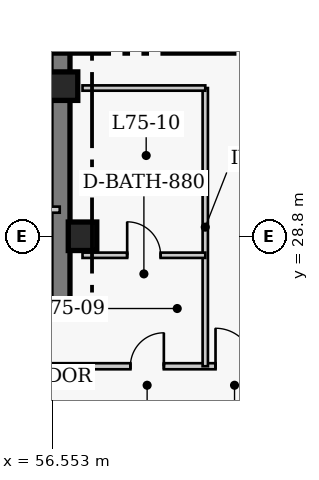
"""IFC4 building model, lengths in metres.
Left out: names, types, materials, properties, quantities, classifications, styles, units other than length and angle.
Written with IfcOpenShell. Run it as: python <this file> out.ifc"""

import sys

from ifc_helpers import new_model, si_unit, direction, frame, frame_2d, origin, origin_2d, place, context, subcontext, project, spatial, rectangle, extrude, element, fill, save


model = new_model("IFC4")
c1 = context("Model", 3, precision=1e-05, world=origin(), true_north=direction((0.0, 1.0)))
c2 = subcontext(c1, "Body", "Model", "MODEL_VIEW")
j1 = project(units=[si_unit("LENGTHUNIT", "METRE"), si_unit("PLANEANGLEUNIT", "RADIAN")], contexts=[c1])
p1 = place(None, origin())
s1 = spatial("IfcSite", under=j1, at=p1, CompositionType="ELEMENT")
p2 = place(p1, origin())
s2 = spatial("IfcBuilding", under=s1, at=p2, CompositionType="ELEMENT")
p3 = place(p2, frame((0.0, 0.0, 302.0)))
s3 = spatial("IfcBuildingStorey", under=s2, at=p3, CompositionType="ELEMENT", Elevation=302.0)
p4 = place(p3, frame((56.77, 27.05, 0.0), z_axis=(0.0, 0.0, 1.0), x_axis=(0.0, 1.0, 0.0)))
e1 = element("IfcWall", 1, at=p4, inside=s3, PredefinedType="SHEAR", context=c2, shape_type="SweptSolid", body=[
    extrude(rectangle(XDim=13.52, YDim=0.5, at=frame_2d((6.76, 0.0))), origin(), (0.0, 0.0, 1.0), 4.6),
])
for number, where, z_axis, x_axis in (
    (2, (57.35, 28.8, 0.0), (0.0, 0.0, 1.0), (1.0, 0.0, 0.0)),
    (3, (56.85, 32.75, 0.0), (0.0, 0.0, 1.0), (1.0, 0.0, 0.0)),
):
    element("IfcColumn", number, at=place(p3, frame(where, z_axis=z_axis, x_axis=x_axis)), inside=s3, PredefinedType="COLUMN", context=c2, shape_type="SweptSolid", body=[
        extrude(rectangle(XDim=0.75, YDim=0.75, at=origin_2d()), origin(), (0.0, 0.0, 1.0), 4.6),
    ])
p5 = place(p3, frame((51.12, 29.5, 0.0), z_axis=(0.0, 0.0, 1.0), x_axis=(1.0, 0.0, 0.0)))
e4 = element("IfcWall", 4, at=p5, inside=s3, PredefinedType="PARTITIONING", context=c2, shape_type="SweptSolid", body=[
    extrude(rectangle(XDim=5.63, YDim=0.16, at=frame_2d((2.815, 0.0))), origin(), (0.0, 0.0, 1.0), 4.31),
])
p6 = place(p3, frame((10.5, 25.38, 0.0), z_axis=(0.0, 0.0, 1.0), x_axis=(1.0, 0.0, 0.0)))
e5 = element("IfcWall", 5, at=p6, inside=s3, PredefinedType="PARTITIONING", context=c2, shape_type="SweptSolid", body=[
    extrude(rectangle(XDim=57.0, YDim=0.16, at=frame_2d((28.5, 0.0))), origin(), (0.0, 0.0, 1.0), 4.31),
])
p7 = place(p6, frame((26.6, 0.0, 0.0)))
e6 = element("IfcOpeningElement", 6, at=p7, cuts=e5, PredefinedType="OPENING", context=c2, shape_type="SweptSolid", body=[
    extrude(rectangle(XDim=1.8, YDim=2.2, at=frame_2d((0.9, 1.1))), frame((0.0, 0.09, 0.0), z_axis=(0.0, -1.0, 0.0), x_axis=(1.0, 0.0, 0.0)), (0.0, 0.0, 1.0), 0.18),
])
p8 = place(p6, frame((17.25, 0.0, 0.0)))
e7 = element("IfcOpeningElement", 7, at=p8, cuts=e5, PredefinedType="OPENING", context=c2, shape_type="SweptSolid", body=[
    extrude(rectangle(XDim=1.0, YDim=2.15, at=frame_2d((0.5, 1.075))), frame((0.0, 0.09, 0.0), z_axis=(0.0, -1.0, 0.0), x_axis=(1.0, 0.0, 0.0)), (0.0, 0.0, 1.0), 0.18),
])
p9 = place(p6, frame((34.5, 0.0, 0.0)))
e8 = element("IfcOpeningElement", 8, at=p9, cuts=e5, PredefinedType="OPENING", context=c2, shape_type="SweptSolid", body=[
    extrude(rectangle(XDim=1.0, YDim=2.15, at=frame_2d((0.5, 1.075))), frame((0.0, 0.09, 0.0), z_axis=(0.0, -1.0, 0.0), x_axis=(1.0, 0.0, 0.0)), (0.0, 0.0, 1.0), 0.18),
])
p10 = place(p6, frame((5.15, 0.0, 0.0)))
e9 = element("IfcOpeningElement", 9, at=p10, cuts=e5, PredefinedType="OPENING", context=c2, shape_type="SweptSolid", body=[
    extrude(rectangle(XDim=1.0, YDim=2.15, at=frame_2d((0.5, 1.075))), frame((0.0, 0.09, 0.0), z_axis=(0.0, -1.0, 0.0), x_axis=(1.0, 0.0, 0.0)), (0.0, 0.0, 1.0), 0.18),
])
p11 = place(p6, frame((48.11, 0.0, 0.0)))
e10 = element("IfcOpeningElement", 10, at=p11, cuts=e5, PredefinedType="OPENING", context=c2, shape_type="SweptSolid", body=[
    extrude(rectangle(XDim=0.88, YDim=2.05, at=frame_2d((0.44, 1.025))), frame((0.0, 0.09, 0.0), z_axis=(0.0, -1.0, 0.0), x_axis=(1.0, 0.0, 0.0)), (0.0, 0.0, 1.0), 0.18),
])
p12 = place(p6, frame((50.35, 0.0, 0.0)))
e11 = element("IfcOpeningElement", 11, at=p12, cuts=e5, PredefinedType="OPENING", context=c2, shape_type="SweptSolid", body=[
    extrude(rectangle(XDim=1.0, YDim=2.15, at=frame_2d((0.5, 1.075))), frame((0.0, 0.09, 0.0), z_axis=(0.0, -1.0, 0.0), x_axis=(1.0, 0.0, 0.0)), (0.0, 0.0, 1.0), 0.18),
])
p13 = place(p3, frame((60.58, 25.38, 0.0), z_axis=(0.0, 0.0, 1.0), x_axis=(0.0, 1.0, 0.0)))
e12 = element("IfcWall", 12, at=p13, inside=s3, PredefinedType="PLUMBINGWALL", context=c2, shape_type="SweptSolid", body=[
    extrude(rectangle(XDim=7.32, YDim=0.14, at=frame_2d((3.66, 0.0))), origin(), (0.0, 0.0, 1.0), 4.31),
])
p14 = place(p3, frame((57.35, 28.3, 0.0), z_axis=(0.0, 0.0, 1.0), x_axis=(1.0, 0.0, 0.0)))
e13 = element("IfcWall", 13, at=p14, inside=s3, PredefinedType="PLUMBINGWALL", context=c2, shape_type="SweptSolid", body=[
    extrude(rectangle(XDim=3.23, YDim=0.14, at=frame_2d((1.615, 0.0))), origin(), (0.0, 0.0, 1.0), 4.31),
])
p15 = place(p14, frame((1.175, 0.0, 0.0)))
e14 = element("IfcOpeningElement", 14, at=p15, cuts=e13, PredefinedType="OPENING", context=c2, shape_type="SweptSolid", body=[
    extrude(rectangle(XDim=0.88, YDim=2.05, at=frame_2d((0.44, 1.025))), frame((0.0, 0.08, 0.0), z_axis=(0.0, -1.0, 0.0), x_axis=(1.0, 0.0, 0.0)), (0.0, 0.0, 1.0), 0.16),
])
p16 = place(p3, frame((57.35, 32.7, 0.0), z_axis=(0.0, 0.0, 1.0), x_axis=(1.0, 0.0, 0.0)))
e15 = element("IfcWall", 15, at=p16, inside=s3, PredefinedType="PLUMBINGWALL", context=c2, shape_type="SweptSolid", body=[
    extrude(rectangle(XDim=3.23, YDim=0.14, at=frame_2d((1.615, 0.0))), origin(), (0.0, 0.0, 1.0), 4.31),
])
p17 = place(p11, origin())
e16 = element("IfcDoor", 16, at=p17, inside=s3, OperationType="SINGLE_SWING_RIGHT", PredefinedType="DOOR", context=c2, shape_type="SweptSolid", body=[
    extrude(rectangle(XDim=0.88, YDim=2.05, at=frame_2d((0.44, 1.025))), frame((0.0, 0.025, 0.0), z_axis=(0.0, -1.0, 0.0), x_axis=(1.0, 0.0, 0.0)), (0.0, 0.0, 1.0), 0.05),
])
fill(e10, e16)
p18 = place(p15, origin())
e17 = element("IfcDoor", 17, at=p18, inside=s3, OperationType="SINGLE_SWING_LEFT", PredefinedType="DOOR", context=c2, shape_type="SweptSolid", body=[
    extrude(rectangle(XDim=0.88, YDim=2.05, at=frame_2d((0.44, 1.025))), frame((0.0, 0.025, 0.0), z_axis=(0.0, -1.0, 0.0), x_axis=(1.0, 0.0, 0.0)), (0.0, 0.0, 1.0), 0.05),
])
fill(e14, e17)
p19 = place(p12, origin())
e18 = element("IfcDoor", 18, at=p19, inside=s3, OperationType="SINGLE_SWING_LEFT", PredefinedType="DOOR", context=c2, shape_type="SweptSolid", body=[
    extrude(rectangle(XDim=1.0, YDim=2.15, at=frame_2d((0.5, 1.075))), frame((0.0, 0.025, 0.0), z_axis=(0.0, -1.0, 0.0), x_axis=(1.0, 0.0, 0.0)), (0.0, 0.0, 1.0), 0.05),
])
fill(e11, e18)
save(model, sys.argv[1])
